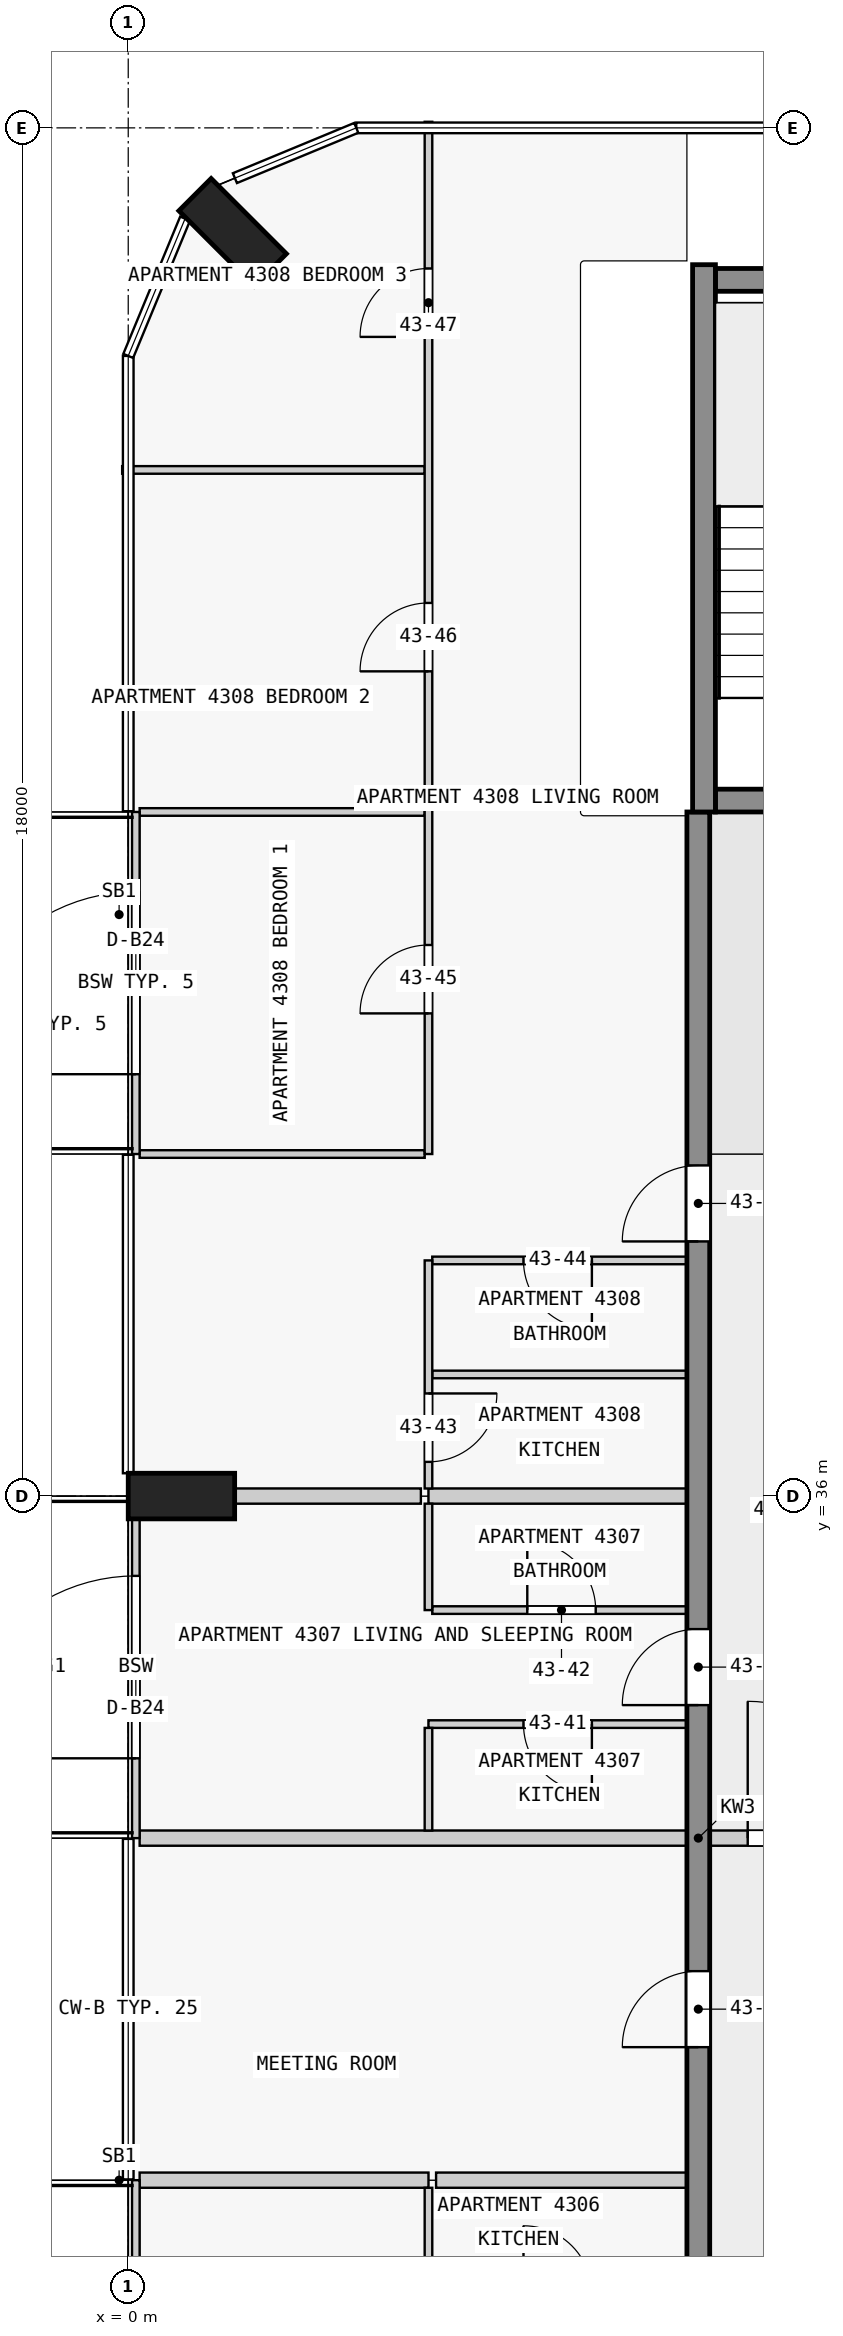
"""IFC4 building model, lengths in metres.
Left out: names, types, materials, properties, quantities, classifications, styles, units other than length and angle.
Written with IfcOpenShell. Run it as: python <this file> out.ifc"""

import sys

from ifc_helpers import new_model, si_unit, direction, frame, frame_2d, origin, origin_2d, place, context, subcontext, project, spatial, rectangle, extrude, element, fill, save


model = new_model("IFC4")
c1 = context("Model", 3, precision=1e-05, world=origin(), true_north=direction((0.0, 1.0)))
c2 = subcontext(c1, "Body", "Model", "MODEL_VIEW")
j1 = project(units=[si_unit("LENGTHUNIT", "METRE"), si_unit("PLANEANGLEUNIT", "RADIAN")], contexts=[c1])
p1 = place(None, origin())
s1 = spatial("IfcSite", under=j1, at=p1, CompositionType="ELEMENT")
p2 = place(p1, origin())
s2 = spatial("IfcBuilding", under=s1, at=p2, CompositionType="ELEMENT")
p3 = place(p2, frame((0.0, 0.0, 167.4)))
s3 = spatial("IfcBuildingStorey", under=s2, at=p3, CompositionType="ELEMENT", Elevation=167.4)
for number, where, z_axis, x_axis in (
    (1, (1.374, 52.626, 0.0), (0.0, 0.0, 1.0), (0.707, 0.707, 0.0)),
    (2, (0.7, 36.0, 0.0), (0.0, 0.0, 1.0), (0.0, 1.0, 0.0)),
):
    element("IfcColumn", number, at=place(p3, frame(where, z_axis=z_axis, x_axis=x_axis)), inside=s3, PredefinedType="COLUMN", context=c2, shape_type="SweptSolid", body=[
        extrude(rectangle(XDim=0.6, YDim=1.4, at=origin_2d()), origin(), (0.0, 0.0, 1.0), 3.5),
    ])
p4 = place(p3, frame((7.725, 45.15, 0.0), z_axis=(0.0, 0.0, 1.0), x_axis=(1.0, 0.0, 0.0)))
e3 = element("IfcWall", 3, at=p4, inside=s3, PredefinedType="SHEAR", context=c2, shape_type="SweptSolid", body=[
    extrude(rectangle(XDim=2.55, YDim=0.3, at=frame_2d((1.275, 0.0))), origin(), (0.0, 0.0, 1.0), 3.5),
])
p5 = place(p4, frame((0.725, 0.0, 0.0)))
e4 = element("IfcOpeningElement", 4, at=p5, cuts=e3, PredefinedType="OPENING", context=c2, shape_type="SweptSolid", body=[
    extrude(rectangle(XDim=1.1, YDim=2.1, at=frame_2d((0.55, 1.05))), frame((0.0, 0.16, 0.0), z_axis=(0.0, -1.0, 0.0), x_axis=(1.0, 0.0, 0.0)), (0.0, 0.0, 1.0), 0.32),
])
p6 = place(p3, frame((7.725, 52.0, 0.0), z_axis=(0.0, 0.0, 1.0), x_axis=(1.0, 0.0, 0.0)))
e5 = element("IfcWall", 5, at=p6, inside=s3, PredefinedType="SHEAR", context=c2, shape_type="SweptSolid", body=[
    extrude(rectangle(XDim=2.55, YDim=0.3, at=frame_2d((1.275, 0.0))), origin(), (0.0, 0.0, 1.0), 3.5),
])
p7 = place(p3, frame((7.575, 45.0, 0.0), z_axis=(0.0, 0.0, 1.0), x_axis=(0.0, 1.0, 0.0)))
e6 = element("IfcWall", 6, at=p7, inside=s3, PredefinedType="SHEAR", context=c2, shape_type="SweptSolid", body=[
    extrude(rectangle(XDim=7.2, YDim=0.3, at=frame_2d((3.6, 0.0))), origin(), (0.0, 0.0, 1.0), 3.5),
])
p8 = place(p3, frame((7.5, 18.0, 0.0), z_axis=(0.0, 0.0, 1.0), x_axis=(0.0, 1.0, 0.0)))
e7 = element("IfcWall", 7, at=p8, inside=s3, PredefinedType="SHEAR", context=c2, shape_type="SweptSolid", body=[
    extrude(rectangle(XDim=27.0, YDim=0.3, at=frame_2d((13.5, 0.0))), origin(), (0.0, 0.0, 1.0), 3.25),
])
p9 = place(p8, frame((1.75, 0.0, 0.0)))
e8 = element("IfcOpeningElement", 8, at=p9, cuts=e7, PredefinedType="OPENING", context=c2, shape_type="SweptSolid", body=[
    extrude(rectangle(XDim=1.0, YDim=2.1, at=frame_2d((0.5, 1.05))), frame((0.0, 0.16, 0.0), z_axis=(0.0, -1.0, 0.0), x_axis=(1.0, 0.0, 0.0)), (0.0, 0.0, 1.0), 0.32),
])
p10 = place(p8, frame((6.25, 0.0, 0.0)))
e9 = element("IfcOpeningElement", 9, at=p10, cuts=e7, PredefinedType="OPENING", context=c2, shape_type="SweptSolid", body=[
    extrude(rectangle(XDim=1.0, YDim=2.1, at=frame_2d((0.5, 1.05))), frame((0.0, 0.16, 0.0), z_axis=(0.0, -1.0, 0.0), x_axis=(1.0, 0.0, 0.0)), (0.0, 0.0, 1.0), 0.32),
])
p11 = place(p8, frame((10.75, 0.0, 0.0)))
e10 = element("IfcOpeningElement", 10, at=p11, cuts=e7, PredefinedType="OPENING", context=c2, shape_type="SweptSolid", body=[
    extrude(rectangle(XDim=1.0, YDim=2.1, at=frame_2d((0.5, 1.05))), frame((0.0, 0.16, 0.0), z_axis=(0.0, -1.0, 0.0), x_axis=(1.0, 0.0, 0.0)), (0.0, 0.0, 1.0), 0.32),
])
p12 = place(p8, frame((15.25, 0.0, 0.0)))
e11 = element("IfcOpeningElement", 11, at=p12, cuts=e7, PredefinedType="OPENING", context=c2, shape_type="SweptSolid", body=[
    extrude(rectangle(XDim=1.0, YDim=2.1, at=frame_2d((0.5, 1.05))), frame((0.0, 0.16, 0.0), z_axis=(0.0, -1.0, 0.0), x_axis=(1.0, 0.0, 0.0)), (0.0, 0.0, 1.0), 0.32),
])
p13 = place(p8, frame((21.35, 0.0, 0.0)))
e12 = element("IfcOpeningElement", 12, at=p13, cuts=e7, PredefinedType="OPENING", context=c2, shape_type="SweptSolid", body=[
    extrude(rectangle(XDim=1.0, YDim=2.1, at=frame_2d((0.5, 1.05))), frame((0.0, 0.16, 0.0), z_axis=(0.0, -1.0, 0.0), x_axis=(1.0, 0.0, 0.0)), (0.0, 0.0, 1.0), 0.32),
])
p14 = place(p3, frame((0.1, 22.5, 0.0), z_axis=(0.0, 0.0, 1.0), x_axis=(0.0, 1.0, 0.0)))
e13 = element("IfcWall", 13, at=p14, inside=s3, PredefinedType="STANDARD", context=c2, shape_type="SweptSolid", body=[
    extrude(rectangle(XDim=4.5, YDim=0.1, at=frame_2d((2.25, 0.0))), origin(), (0.0, 0.0, 1.0), 3.25),
])
p15 = place(p14, frame((1.05, 0.0, 0.0)))
e14 = element("IfcOpeningElement", 14, at=p15, cuts=e13, PredefinedType="OPENING", context=c2, shape_type="SweptSolid", body=[
    extrude(rectangle(XDim=2.4, YDim=2.4, at=frame_2d((1.2, 1.2))), frame((0.0, 0.06, 0.0), z_axis=(0.0, -1.0, 0.0), x_axis=(1.0, 0.0, 0.0)), (0.0, 0.0, 1.0), 0.12),
])
p16 = place(p3, frame((0.1, 31.5, 0.0), z_axis=(0.0, 0.0, 1.0), x_axis=(0.0, 1.0, 0.0)))
e15 = element("IfcWall", 15, at=p16, inside=s3, PredefinedType="STANDARD", context=c2, shape_type="SweptSolid", body=[
    extrude(rectangle(XDim=4.5, YDim=0.1, at=frame_2d((2.25, 0.0))), origin(), (0.0, 0.0, 1.0), 3.25),
])
p17 = place(p16, frame((1.05, 0.0, 0.0)))
e16 = element("IfcOpeningElement", 16, at=p17, cuts=e15, PredefinedType="OPENING", context=c2, shape_type="SweptSolid", body=[
    extrude(rectangle(XDim=2.4, YDim=2.4, at=frame_2d((1.2, 1.2))), frame((0.0, 0.06, 0.0), z_axis=(0.0, -1.0, 0.0), x_axis=(1.0, 0.0, 0.0)), (0.0, 0.0, 1.0), 0.12),
])
p18 = place(p3, frame((0.1, 40.5, 0.0), z_axis=(0.0, 0.0, 1.0), x_axis=(0.0, 1.0, 0.0)))
e17 = element("IfcWall", 17, at=p18, inside=s3, PredefinedType="STANDARD", context=c2, shape_type="SweptSolid", body=[
    extrude(rectangle(XDim=4.5, YDim=0.1, at=frame_2d((2.25, 0.0))), origin(), (0.0, 0.0, 1.0), 3.25),
])
p19 = place(p18, frame((1.05, 0.0, 0.0)))
e18 = element("IfcOpeningElement", 18, at=p19, cuts=e17, PredefinedType="OPENING", context=c2, shape_type="SweptSolid", body=[
    extrude(rectangle(XDim=2.4, YDim=2.4, at=frame_2d((1.2, 1.2))), frame((0.0, 0.06, 0.0), z_axis=(0.0, -1.0, 0.0), x_axis=(1.0, 0.0, 0.0)), (0.0, 0.0, 1.0), 0.12),
])
p20 = place(p3, frame((7.35, 27.0, 0.0), z_axis=(0.0, 0.0, 1.0), x_axis=(-1.0, 0.0, 0.0)))
e19 = element("IfcWall", 19, at=p20, inside=s3, PredefinedType="PARTITIONING", context=c2, shape_type="SweptSolid", body=[
    extrude(rectangle(XDim=3.3, YDim=0.2, at=frame_2d((1.65, 0.0))), origin(), (0.0, 0.0, 1.0), 3.25),
])
p21 = place(p3, frame((0.15, 27.0, 0.0), z_axis=(0.0, 0.0, 1.0), x_axis=(1.0, 0.0, 0.0)))
e20 = element("IfcWall", 20, at=p21, inside=s3, PredefinedType="PARTITIONING", context=c2, shape_type="SweptSolid", body=[
    extrude(rectangle(XDim=3.8, YDim=0.2, at=frame_2d((1.9, 0.0))), origin(), (0.0, 0.0, 1.0), 3.25),
])
p22 = place(p3, frame((7.35, 31.5, 0.0), z_axis=(0.0, 0.0, 1.0), x_axis=(-1.0, 0.0, 0.0)))
e21 = element("IfcWall", 21, at=p22, inside=s3, PredefinedType="PARTITIONING", context=c2, shape_type="SweptSolid", body=[
    extrude(rectangle(XDim=7.2, YDim=0.2, at=frame_2d((3.6, 0.0))), origin(), (0.0, 0.0, 1.0), 3.25),
])
p23 = place(p3, frame((7.35, 33.0, 0.0), z_axis=(0.0, 0.0, 1.0), x_axis=(-1.0, 0.0, 0.0)))
e22 = element("IfcWall", 22, at=p23, inside=s3, PredefinedType="PARTITIONING", context=c2, shape_type="SweptSolid", body=[
    extrude(rectangle(XDim=3.4, YDim=0.1, at=frame_2d((1.7, 0.0))), origin(), (0.0, 0.0, 1.0), 3.25),
])
p24 = place(p23, frame((1.25, 0.0, 0.0)))
e23 = element("IfcOpeningElement", 23, at=p24, cuts=e22, PredefinedType="OPENING", context=c2, shape_type="SweptSolid", body=[
    extrude(rectangle(XDim=0.9, YDim=2.1, at=frame_2d((0.45, 1.05))), frame((0.0, 0.06, 0.0), z_axis=(0.0, -1.0, 0.0), x_axis=(1.0, 0.0, 0.0)), (0.0, 0.0, 1.0), 0.12),
])
p25 = place(p3, frame((4.0, 34.5, 0.0), z_axis=(0.0, 0.0, 1.0), x_axis=(1.0, 0.0, 0.0)))
e24 = element("IfcWall", 24, at=p25, inside=s3, PredefinedType="PARTITIONING", context=c2, shape_type="SweptSolid", body=[
    extrude(rectangle(XDim=3.35, YDim=0.1, at=frame_2d((1.675, 0.0))), origin(), (0.0, 0.0, 1.0), 3.25),
])
p26 = place(p25, frame((1.25, 0.0, 0.0)))
e25 = element("IfcOpeningElement", 25, at=p26, cuts=e24, PredefinedType="OPENING", context=c2, shape_type="SweptSolid", body=[
    extrude(rectangle(XDim=0.9, YDim=2.1, at=frame_2d((0.45, 1.05))), frame((0.0, 0.06, 0.0), z_axis=(0.0, -1.0, 0.0), x_axis=(1.0, 0.0, 0.0)), (0.0, 0.0, 1.0), 0.12),
])
p27 = place(p3, frame((7.35, 36.0, 0.0), z_axis=(0.0, 0.0, 1.0), x_axis=(-1.0, 0.0, 0.0)))
e26 = element("IfcWall", 26, at=p27, inside=s3, PredefinedType="PARTITIONING", context=c2, shape_type="SweptSolid", body=[
    extrude(rectangle(XDim=3.4, YDim=0.2, at=frame_2d((1.7, 0.0))), origin(), (0.0, 0.0, 1.0), 3.25),
])
p28 = place(p3, frame((1.4, 36.0, 0.0), z_axis=(0.0, 0.0, 1.0), x_axis=(1.0, 0.0, 0.0)))
e27 = element("IfcWall", 27, at=p28, inside=s3, PredefinedType="PARTITIONING", context=c2, shape_type="SweptSolid", body=[
    extrude(rectangle(XDim=2.45, YDim=0.2, at=frame_2d((1.225, 0.0))), origin(), (0.0, 0.0, 1.0), 3.25),
])
p29 = place(p3, frame((7.35, 37.6, 0.0), z_axis=(0.0, 0.0, 1.0), x_axis=(-1.0, 0.0, 0.0)))
e28 = element("IfcWall", 28, at=p29, inside=s3, PredefinedType="PARTITIONING", context=c2, shape_type="SweptSolid", body=[
    extrude(rectangle(XDim=3.35, YDim=0.1, at=frame_2d((1.675, 0.0))), origin(), (0.0, 0.0, 1.0), 3.25),
])
p30 = place(p3, frame((7.35, 39.1, 0.0), z_axis=(0.0, 0.0, 1.0), x_axis=(-1.0, 0.0, 0.0)))
e29 = element("IfcWall", 29, at=p30, inside=s3, PredefinedType="PARTITIONING", context=c2, shape_type="SweptSolid", body=[
    extrude(rectangle(XDim=3.35, YDim=0.1, at=frame_2d((1.675, 0.0))), origin(), (0.0, 0.0, 1.0), 3.25),
])
p31 = place(p30, frame((1.25, 0.0, 0.0)))
e30 = element("IfcOpeningElement", 30, at=p31, cuts=e29, PredefinedType="OPENING", context=c2, shape_type="SweptSolid", body=[
    extrude(rectangle(XDim=0.9, YDim=2.1, at=frame_2d((0.45, 1.05))), frame((0.0, 0.06, 0.0), z_axis=(0.0, -1.0, 0.0), x_axis=(1.0, 0.0, 0.0)), (0.0, 0.0, 1.0), 0.12),
])
for number, where, z_axis, x_axis in (
    (31, (0.15, 40.5, 0.0), (0.0, 0.0, 1.0), (1.0, 0.0, 0.0)),
    (32, (3.9, 45.0, 0.0), (0.0, 0.0, 1.0), (-1.0, 0.0, 0.0)),
):
    element("IfcWall", number, at=place(p3, frame(where, z_axis=z_axis, x_axis=x_axis)), inside=s3, PredefinedType="PARTITIONING", context=c2, shape_type="SweptSolid", body=[
        extrude(rectangle(XDim=3.75, YDim=0.1, at=frame_2d((1.875, 0.0))), origin(), (0.0, 0.0, 1.0), 3.25),
    ])
p32 = place(p3, frame((3.9, 49.5, 0.0), z_axis=(0.0, 0.0, 1.0), x_axis=(-1.0, 0.0, 0.0)))
e33 = element("IfcWall", 33, at=p32, inside=s3, PredefinedType="PARTITIONING", context=c2, shape_type="SweptSolid", body=[
    extrude(rectangle(XDim=3.98, YDim=0.1, at=frame_2d((1.99, 0.0))), origin(), (0.0, 0.0, 1.0), 3.25),
])
for number, where, z_axis, x_axis in (
    (34, (3.95, 26.9, 0.0), (0.0, 0.0, 1.0), (0.0, -1.0, 0.0)),
    (35, (3.95, 32.95, 0.0), (0.0, 0.0, 1.0), (0.0, -1.0, 0.0)),
):
    element("IfcWall", number, at=place(p3, frame(where, z_axis=z_axis, x_axis=x_axis)), inside=s3, PredefinedType="PARTITIONING", context=c2, shape_type="SweptSolid", body=[
        extrude(rectangle(XDim=1.35, YDim=0.1, at=frame_2d((0.675, 0.0))), origin(), (0.0, 0.0, 1.0), 3.25),
    ])
p33 = place(p3, frame((3.95, 35.9, 0.0), z_axis=(0.0, 0.0, 1.0), x_axis=(0.0, -1.0, 0.0)))
e36 = element("IfcWall", 36, at=p33, inside=s3, PredefinedType="PARTITIONING", context=c2, shape_type="SweptSolid", body=[
    extrude(rectangle(XDim=1.4, YDim=0.1, at=frame_2d((0.7, 0.0))), origin(), (0.0, 0.0, 1.0), 3.25),
])
p34 = place(p3, frame((3.95, 39.1, 0.0), z_axis=(0.0, 0.0, 1.0), x_axis=(0.0, -1.0, 0.0)))
e37 = element("IfcWall", 37, at=p34, inside=s3, PredefinedType="PARTITIONING", context=c2, shape_type="SweptSolid", body=[
    extrude(rectangle(XDim=3.0, YDim=0.1, at=frame_2d((1.5, 0.0))), origin(), (0.0, 0.0, 1.0), 3.25),
])
p35 = place(p34, frame((1.75, 0.0, 0.0)))
e38 = element("IfcOpeningElement", 38, at=p35, cuts=e37, PredefinedType="OPENING", context=c2, shape_type="SweptSolid", body=[
    extrude(rectangle(XDim=0.9, YDim=2.1, at=frame_2d((0.45, 1.05))), frame((0.0, 0.06, 0.0), z_axis=(0.0, -1.0, 0.0), x_axis=(1.0, 0.0, 0.0)), (0.0, 0.0, 1.0), 0.12),
])
p36 = place(p3, frame((3.95, 40.5, 0.0), z_axis=(0.0, 0.0, 1.0), x_axis=(0.0, 1.0, 0.0)))
e39 = element("IfcWall", 39, at=p36, inside=s3, PredefinedType="PARTITIONING", context=c2, shape_type="SweptSolid", body=[
    extrude(rectangle(XDim=13.58, YDim=0.1, at=frame_2d((6.79, 0.0))), origin(), (0.0, 0.0, 1.0), 3.25),
])
p37 = place(p36, frame((1.85, 0.0, 0.0)))
e40 = element("IfcOpeningElement", 40, at=p37, cuts=e39, PredefinedType="OPENING", context=c2, shape_type="SweptSolid", body=[
    extrude(rectangle(XDim=0.9, YDim=2.1, at=frame_2d((0.45, 1.05))), frame((0.0, 0.06, 0.0), z_axis=(0.0, -1.0, 0.0), x_axis=(1.0, 0.0, 0.0)), (0.0, 0.0, 1.0), 0.12),
])
p38 = place(p36, frame((6.35, 0.0, 0.0)))
e41 = element("IfcOpeningElement", 41, at=p38, cuts=e39, PredefinedType="OPENING", context=c2, shape_type="SweptSolid", body=[
    extrude(rectangle(XDim=0.9, YDim=2.1, at=frame_2d((0.45, 1.05))), frame((0.0, 0.06, 0.0), z_axis=(0.0, -1.0, 0.0), x_axis=(1.0, 0.0, 0.0)), (0.0, 0.0, 1.0), 0.12),
])
p39 = place(p36, frame((10.75, 0.0, 0.0)))
e42 = element("IfcOpeningElement", 42, at=p39, cuts=e39, PredefinedType="OPENING", context=c2, shape_type="SweptSolid", body=[
    extrude(rectangle(XDim=0.9, YDim=2.1, at=frame_2d((0.45, 1.05))), frame((0.0, 0.06, 0.0), z_axis=(0.0, -1.0, 0.0), x_axis=(1.0, 0.0, 0.0)), (0.0, 0.0, 1.0), 0.12),
])
p40 = place(p3, frame((7.45, 31.5, 0.0), z_axis=(0.0, 0.0, 1.0), x_axis=(1.0, 0.0, 0.0)))
e43 = element("IfcWall", 43, at=p40, inside=s3, PredefinedType="PARTITIONING", context=c2, shape_type="SweptSolid", body=[
    extrude(rectangle(XDim=3.1, YDim=0.2, at=frame_2d((1.55, 0.0))), origin(), (0.0, 0.0, 1.0), 3.25),
])
p41 = place(p40, frame((0.7, 0.0, 0.0)))
e44 = element("IfcOpeningElement", 44, at=p41, cuts=e43, PredefinedType="OPENING", context=c2, shape_type="SweptSolid", body=[
    extrude(rectangle(XDim=1.8, YDim=2.1, at=frame_2d((0.9, 1.05))), frame((0.0, 0.11, 0.0), z_axis=(0.0, -1.0, 0.0), x_axis=(1.0, 0.0, 0.0)), (0.0, 0.0, 1.0), 0.22),
])
p42 = place(p17, origin())
e45 = element("IfcDoor", 45, at=p42, inside=s3, OperationType="SINGLE_SWING_LEFT", PredefinedType="DOOR", context=c2, shape_type="SweptSolid", body=[
    extrude(rectangle(XDim=2.4, YDim=2.4, at=frame_2d((1.2, 1.2))), frame((0.0, 0.025, 0.0), z_axis=(0.0, -1.0, 0.0), x_axis=(1.0, 0.0, 0.0)), (0.0, 0.0, 1.0), 0.05),
])
fill(e16, e45)
p43 = place(p19, origin())
e46 = element("IfcDoor", 46, at=p43, inside=s3, OperationType="SINGLE_SWING_LEFT", PredefinedType="DOOR", context=c2, shape_type="SweptSolid", body=[
    extrude(rectangle(XDim=2.4, YDim=2.4, at=frame_2d((1.2, 1.2))), frame((0.0, 0.025, 0.0), z_axis=(0.0, -1.0, 0.0), x_axis=(1.0, 0.0, 0.0)), (0.0, 0.0, 1.0), 0.05),
])
fill(e18, e46)
p44 = place(p11, origin())
e47 = element("IfcDoor", 47, at=p44, inside=s3, OperationType="SINGLE_SWING_LEFT", PredefinedType="DOOR", context=c2, shape_type="SweptSolid", body=[
    extrude(rectangle(XDim=1.0, YDim=2.1, at=frame_2d((0.5, 1.05))), frame((0.0, 0.025, 0.0), z_axis=(0.0, -1.0, 0.0), x_axis=(1.0, 0.0, 0.0)), (0.0, 0.0, 1.0), 0.05),
])
fill(e10, e47)
p45 = place(p12, origin())
e48 = element("IfcDoor", 48, at=p45, inside=s3, OperationType="SINGLE_SWING_RIGHT", PredefinedType="DOOR", context=c2, shape_type="SweptSolid", body=[
    extrude(rectangle(XDim=1.0, YDim=2.1, at=frame_2d((0.5, 1.05))), frame((0.0, 0.025, 0.0), z_axis=(0.0, -1.0, 0.0), x_axis=(1.0, 0.0, 0.0)), (0.0, 0.0, 1.0), 0.05),
])
fill(e11, e48)
p46 = place(p13, origin())
e49 = element("IfcDoor", 49, at=p46, inside=s3, OperationType="SINGLE_SWING_RIGHT", PredefinedType="DOOR", context=c2, shape_type="SweptSolid", body=[
    extrude(rectangle(XDim=1.0, YDim=2.1, at=frame_2d((0.5, 1.05))), frame((0.0, 0.025, 0.0), z_axis=(0.0, -1.0, 0.0), x_axis=(1.0, 0.0, 0.0)), (0.0, 0.0, 1.0), 0.05),
])
fill(e12, e49)
p47 = place(p41, origin())
e50 = element("IfcDoor", 50, at=p47, inside=s3, OperationType="SINGLE_SWING_RIGHT", PredefinedType="DOOR", context=c2, shape_type="SweptSolid", body=[
    extrude(rectangle(XDim=1.8, YDim=2.1, at=frame_2d((0.9, 1.05))), frame((0.0, 0.025, 0.0), z_axis=(0.0, -1.0, 0.0), x_axis=(1.0, 0.0, 0.0)), (0.0, 0.0, 1.0), 0.05),
])
fill(e44, e50)
p48 = place(p24, origin())
e51 = element("IfcDoor", 51, at=p48, inside=s3, OperationType="SINGLE_SWING_RIGHT", PredefinedType="DOOR", context=c2, shape_type="SweptSolid", body=[
    extrude(rectangle(XDim=0.9, YDim=2.1, at=frame_2d((0.45, 1.05))), frame((0.0, 0.025, 0.0), z_axis=(0.0, -1.0, 0.0), x_axis=(1.0, 0.0, 0.0)), (0.0, 0.0, 1.0), 0.05),
])
fill(e23, e51)
p49 = place(p26, origin())
e52 = element("IfcDoor", 52, at=p49, inside=s3, OperationType="SINGLE_SWING_RIGHT", PredefinedType="DOOR", context=c2, shape_type="SweptSolid", body=[
    extrude(rectangle(XDim=0.9, YDim=2.1, at=frame_2d((0.45, 1.05))), frame((0.0, 0.025, 0.0), z_axis=(0.0, -1.0, 0.0), x_axis=(1.0, 0.0, 0.0)), (0.0, 0.0, 1.0), 0.05),
])
fill(e25, e52)
p50 = place(p35, origin())
e53 = element("IfcDoor", 53, at=p50, inside=s3, OperationType="SINGLE_SWING_RIGHT", PredefinedType="DOOR", context=c2, shape_type="SweptSolid", body=[
    extrude(rectangle(XDim=0.9, YDim=2.1, at=frame_2d((0.45, 1.05))), frame((0.0, 0.025, 0.0), z_axis=(0.0, -1.0, 0.0), x_axis=(1.0, 0.0, 0.0)), (0.0, 0.0, 1.0), 0.05),
])
fill(e38, e53)
p51 = place(p31, origin())
e54 = element("IfcDoor", 54, at=p51, inside=s3, OperationType="SINGLE_SWING_RIGHT", PredefinedType="DOOR", context=c2, shape_type="SweptSolid", body=[
    extrude(rectangle(XDim=0.9, YDim=2.1, at=frame_2d((0.45, 1.05))), frame((0.0, 0.025, 0.0), z_axis=(0.0, -1.0, 0.0), x_axis=(1.0, 0.0, 0.0)), (0.0, 0.0, 1.0), 0.05),
])
fill(e30, e54)
p52 = place(p37, origin())
e55 = element("IfcDoor", 55, at=p52, inside=s3, OperationType="SINGLE_SWING_LEFT", PredefinedType="DOOR", context=c2, shape_type="SweptSolid", body=[
    extrude(rectangle(XDim=0.9, YDim=2.1, at=frame_2d((0.45, 1.05))), frame((0.0, 0.025, 0.0), z_axis=(0.0, -1.0, 0.0), x_axis=(1.0, 0.0, 0.0)), (0.0, 0.0, 1.0), 0.05),
])
fill(e40, e55)
p53 = place(p38, origin())
e56 = element("IfcDoor", 56, at=p53, inside=s3, OperationType="SINGLE_SWING_RIGHT", PredefinedType="DOOR", context=c2, shape_type="SweptSolid", body=[
    extrude(rectangle(XDim=0.9, YDim=2.1, at=frame_2d((0.45, 1.05))), frame((0.0, 0.025, 0.0), z_axis=(0.0, -1.0, 0.0), x_axis=(1.0, 0.0, 0.0)), (0.0, 0.0, 1.0), 0.05),
])
fill(e41, e56)
p54 = place(p39, origin())
e57 = element("IfcDoor", 57, at=p54, inside=s3, OperationType="SINGLE_SWING_RIGHT", PredefinedType="DOOR", context=c2, shape_type="SweptSolid", body=[
    extrude(rectangle(XDim=0.9, YDim=2.1, at=frame_2d((0.45, 1.05))), frame((0.0, 0.025, 0.0), z_axis=(0.0, -1.0, 0.0), x_axis=(1.0, 0.0, 0.0)), (0.0, 0.0, 1.0), 0.05),
])
fill(e42, e57)
save(model, sys.argv[1])
